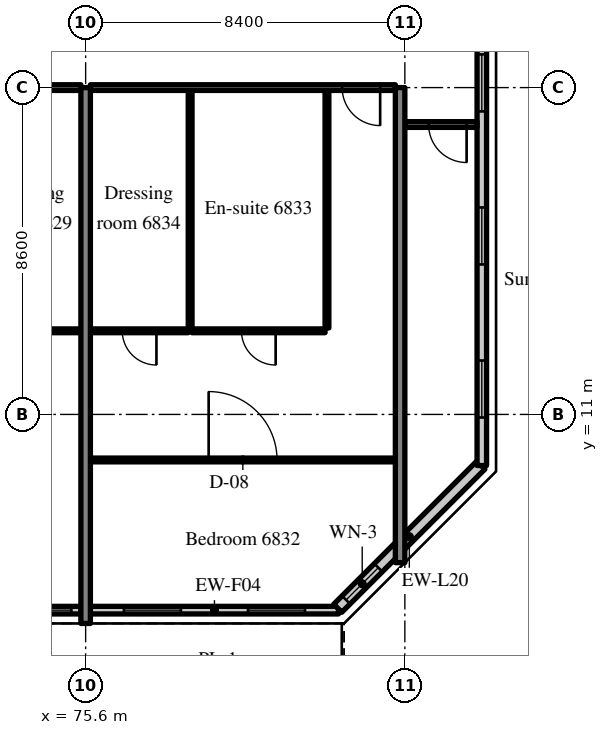
"""IFC4 building model, lengths in metres.
Left out: names, types, materials, properties, quantities, classifications, styles, units other than length and angle.
Written with IfcOpenShell. Run it as: python <this file> out.ifc"""

import sys

from ifc_helpers import new_model, si_unit, direction, frame, frame_2d, origin, place, context, subcontext, project, spatial, rectangle, extrude, source, transform, mapped, element, fill, save


model = new_model("IFC4")
c1 = context("Model", 3, precision=1e-05, world=origin(), true_north=direction((0.0, 1.0)))
c2 = subcontext(c1, "Body", "Model", "MODEL_VIEW")
j1 = project(units=[si_unit("LENGTHUNIT", "METRE"), si_unit("PLANEANGLEUNIT", "RADIAN")], contexts=[c1])
p1 = place(None, origin())
s1 = spatial("IfcSite", under=j1, at=p1, CompositionType="ELEMENT")
p2 = place(p1, origin())
s2 = spatial("IfcBuilding", under=s1, at=p2, CompositionType="ELEMENT")
p3 = place(p2, frame((0.0, 0.0, 285.7)))
s3 = spatial("IfcBuildingStorey", under=s2, at=p3, CompositionType="ELEMENT", Elevation=285.7)
m1 = source(origin(), c2, "Body", "SweptSolid", [
    extrude(rectangle(XDim=14.1, YDim=0.25, at=frame_2d((7.05, 0.0))), origin(), (0.0, 0.0, 1.0), 3.72),
])
p4 = place(p3, frame((75.6, 5.5, 0.0), z_axis=(0.0, 0.0, 1.0), x_axis=(0.0, 1.0, 0.0)))
e1 = element("IfcWall", 1, at=p4, inside=s3, PredefinedType="SHEAR", context=c2, shape_type="MappedRepresentation", body=[
    mapped(m1, transform((0.0, 0.0, 0.0), scale=1.0)),
])
m2 = source(origin(), c2, "Body", "SweptSolid", [
    extrude(rectangle(XDim=12.5, YDim=0.25, at=frame_2d((6.25, 0.0))), origin(), (0.0, 0.0, 1.0), 3.72),
])
p5 = place(p3, frame((83.875, 7.1, 0.0), z_axis=(0.0, 0.0, 1.0), x_axis=(0.0, 1.0, 0.0)))
e2 = element("IfcWall", 2, at=p5, inside=s3, PredefinedType="SHEAR", context=c2, shape_type="MappedRepresentation", body=[
    mapped(m2, transform((0.0, 0.0, 0.0), scale=1.0)),
])
m3 = source(origin(), c2, "Body", "SweptSolid", [
    extrude(rectangle(XDim=8.15, YDim=0.2, at=frame_2d((4.075, 0.0))), origin(), (0.0, 0.0, 1.0), 3.17),
])
p6 = place(p3, frame((67.325, 5.85, 0.0), z_axis=(0.0, 0.0, 1.0), x_axis=(1.0, 0.0, 0.0)))
e3 = element("IfcWall", 3, at=p6, inside=s3, PredefinedType="SOLIDWALL", context=c2, shape_type="MappedRepresentation", body=[
    mapped(m3, transform((0.0, 0.0, 0.0), scale=1.0)),
])
m4 = source(origin(), c2, "Body", "SweptSolid", [
    extrude(rectangle(XDim=1.2, YDim=2.4, at=frame_2d((0.6, 1.2))), frame((0.0, 0.11, 0.0), z_axis=(0.0, -1.0, 0.0), x_axis=(1.0, 0.0, 0.0)), (0.0, 0.0, 1.0), 0.22),
])
p7 = place(p6, frame((0.25, 0.0, 0.0)))
e4 = element("IfcOpeningElement", 4, at=p7, cuts=e3, PredefinedType="OPENING", context=c2, shape_type="MappedRepresentation", body=[
    mapped(m4, transform((0.0, 0.0, 0.0), scale=1.0)),
])
m5 = source(origin(), c2, "Body", "SweptSolid", [
    extrude(rectangle(XDim=1.5, YDim=1.5, at=frame_2d((0.75, 0.75))), frame((0.0, 0.11, 0.0), z_axis=(0.0, -1.0, 0.0), x_axis=(1.0, 0.0, 0.0)), (0.0, 0.0, 1.0), 0.22),
])
p8 = place(p6, frame((2.325, 0.0, 0.9)))
e5 = element("IfcOpeningElement", 5, at=p8, cuts=e3, PredefinedType="OPENING", context=c2, shape_type="MappedRepresentation", body=[
    mapped(m5, transform((0.0, 0.0, 0.0), scale=1.0)),
])
p9 = place(p6, frame((4.325, 0.0, 0.0)))
e6 = element("IfcOpeningElement", 6, at=p9, cuts=e3, PredefinedType="OPENING", context=c2, shape_type="MappedRepresentation", body=[
    mapped(m4, transform((0.0, 0.0, 0.0), scale=1.0)),
])
p10 = place(p6, frame((6.4, 0.0, 0.9)))
e7 = element("IfcOpeningElement", 7, at=p10, cuts=e3, PredefinedType="OPENING", context=c2, shape_type="MappedRepresentation", body=[
    mapped(m5, transform((0.0, 0.0, 0.0), scale=1.0)),
])
m6 = source(origin(), c2, "Body", "SweptSolid", [
    extrude(rectangle(XDim=6.53, YDim=0.2, at=frame_2d((3.265, 0.0))), origin(), (0.0, 0.0, 1.0), 3.17),
])
p11 = place(p3, frame((75.725, 5.85, 0.0), z_axis=(0.0, 0.0, 1.0), x_axis=(1.0, 0.0, 0.0)))
e8 = element("IfcWall", 8, at=p11, inside=s3, PredefinedType="SOLIDWALL", context=c2, shape_type="MappedRepresentation", body=[
    mapped(m6, transform((0.0, 0.0, 0.0), scale=1.0)),
])
p12 = place(p11, frame((0.883, 0.0, 0.9)))
e9 = element("IfcOpeningElement", 9, at=p12, cuts=e8, PredefinedType="OPENING", context=c2, shape_type="MappedRepresentation", body=[
    mapped(m5, transform((0.0, 0.0, 0.0), scale=1.0)),
])
p13 = place(p11, frame((4.147, 0.0, 0.9)))
e10 = element("IfcOpeningElement", 10, at=p13, cuts=e8, PredefinedType="OPENING", context=c2, shape_type="MappedRepresentation", body=[
    mapped(m5, transform((0.0, 0.0, 0.0), scale=1.0)),
])
m7 = source(origin(), c2, "Body", "SweptSolid", [
    extrude(rectangle(XDim=5.326, YDim=0.3, at=frame_2d((2.663, 0.0))), origin(), (0.0, 0.0, 1.0), 3.72),
])
p14 = place(p3, frame((82.234, 5.9, 0.0), z_axis=(0.0, 0.0, 1.0), x_axis=(0.707083859269, 0.707129702361, 0.0)))
e11 = element("IfcWall", 11, at=p14, inside=s3, PredefinedType="SOLIDWALL", context=c2, shape_type="MappedRepresentation", body=[
    mapped(m7, transform((0.0, 0.0, 0.0), scale=1.0)),
])
m8 = source(origin(), c2, "Body", "SweptSolid", [
    extrude(rectangle(XDim=1.2, YDim=1.5, at=frame_2d((0.6, 0.75))), frame((0.0, 0.16, 0.0), z_axis=(0.0, -1.0, 0.0), x_axis=(1.0, 0.0, 0.0)), (0.0, 0.0, 1.0), 0.32),
])
p15 = place(p14, frame((0.31, 0.0, 0.9)))
e12 = element("IfcOpeningElement", 12, at=p15, cuts=e11, PredefinedType="OPENING", context=c2, shape_type="MappedRepresentation", body=[
    mapped(m8, transform((0.0, 0.0, 0.0), scale=1.0)),
])
m9 = source(origin(), c2, "Body", "SweptSolid", [
    extrude(rectangle(XDim=28.189, YDim=0.25, at=frame_2d((14.095, 0.0))), origin(), (0.0, 0.0, 1.0), 3.72),
])
p16 = place(p3, frame((86.025, 9.655, 0.0), z_axis=(0.0, 0.0, 1.0), x_axis=(0.0, 1.0, 0.0)))
e13 = element("IfcWall", 13, at=p16, inside=s3, PredefinedType="SOLIDWALL", context=c2, shape_type="MappedRepresentation", body=[
    mapped(m9, transform((0.0, 0.0, 0.0), scale=1.0)),
])
m10 = source(origin(), c2, "Body", "SweptSolid", [
    extrude(rectangle(XDim=1.5, YDim=1.5, at=frame_2d((0.75, 0.75))), frame((0.0, 0.135, 0.0), z_axis=(0.0, -1.0, 0.0), x_axis=(1.0, 0.0, 0.0)), (0.0, 0.0, 1.0), 0.27),
])
p17 = place(p16, frame((1.263, 0.0, 0.9)))
e14 = element("IfcOpeningElement", 14, at=p17, cuts=e13, PredefinedType="OPENING", context=c2, shape_type="MappedRepresentation", body=[
    mapped(m10, transform((0.0, 0.0, 0.0), scale=1.0)),
])
p18 = place(p16, frame((5.291, 0.0, 0.9)))
e15 = element("IfcOpeningElement", 15, at=p18, cuts=e13, PredefinedType="OPENING", context=c2, shape_type="MappedRepresentation", body=[
    mapped(m10, transform((0.0, 0.0, 0.0), scale=1.0)),
])
p19 = place(p16, frame((9.318, 0.0, 0.9)))
e16 = element("IfcOpeningElement", 16, at=p19, cuts=e13, PredefinedType="OPENING", context=c2, shape_type="MappedRepresentation", body=[
    mapped(m10, transform((0.0, 0.0, 0.0), scale=1.0)),
])
p20 = place(p16, frame((13.345, 0.0, 0.9)))
e17 = element("IfcOpeningElement", 17, at=p20, cuts=e13, PredefinedType="OPENING", context=c2, shape_type="MappedRepresentation", body=[
    mapped(m10, transform((0.0, 0.0, 0.0), scale=1.0)),
])
p21 = place(p16, frame((17.372, 0.0, 0.9)))
e18 = element("IfcOpeningElement", 18, at=p21, cuts=e13, PredefinedType="OPENING", context=c2, shape_type="MappedRepresentation", body=[
    mapped(m10, transform((0.0, 0.0, 0.0), scale=1.0)),
])
p22 = place(p16, frame((21.399, 0.0, 0.9)))
e19 = element("IfcOpeningElement", 19, at=p22, cuts=e13, PredefinedType="OPENING", context=c2, shape_type="MappedRepresentation", body=[
    mapped(m10, transform((0.0, 0.0, 0.0), scale=1.0)),
])
p23 = place(p16, frame((25.426, 0.0, 0.9)))
e20 = element("IfcOpeningElement", 20, at=p23, cuts=e13, PredefinedType="OPENING", context=c2, shape_type="MappedRepresentation", body=[
    mapped(m10, transform((0.0, 0.0, 0.0), scale=1.0)),
])
m11 = source(origin(), c2, "Body", "SweptSolid", [
    extrude(rectangle(XDim=2.7, YDim=0.1, at=frame_2d((1.35, 0.0))), origin(), (0.0, 0.0, 1.0), 3.72),
])
p24 = place(p3, frame((72.775, 13.2, 0.0), z_axis=(0.0, 0.0, 1.0), x_axis=(1.0, 0.0, 0.0)))
e21 = element("IfcWall", 21, at=p24, inside=s3, PredefinedType="PARTITIONING", context=c2, shape_type="MappedRepresentation", body=[
    mapped(m11, transform((0.0, 0.0, 0.0), scale=1.0)),
])
m12 = source(origin(), c2, "Body", "SweptSolid", [
    extrude(rectangle(XDim=0.9, YDim=2.1, at=frame_2d((0.45, 1.05))), frame((0.0, 0.06, 0.0), z_axis=(0.0, -1.0, 0.0), x_axis=(1.0, 0.0, 0.0)), (0.0, 0.0, 1.0), 0.12),
])
p25 = place(p24, frame((0.9, 0.0, 0.0)))
e22 = element("IfcOpeningElement", 22, at=p25, cuts=e21, PredefinedType="OPENING", context=c2, shape_type="MappedRepresentation", body=[
    mapped(m12, transform((0.0, 0.0, 0.0), scale=1.0)),
])
m13 = source(origin(), c2, "Body", "SweptSolid", [
    extrude(rectangle(XDim=8.15, YDim=0.15, at=frame_2d((4.075, 0.0))), origin(), (0.0, 0.0, 1.0), 3.02),
])
p26 = place(p3, frame((67.325, 19.6, 0.0), z_axis=(0.0, 0.0, 1.0), x_axis=(1.0, 0.0, 0.0)))
e23 = element("IfcWall", 23, at=p26, inside=s3, PredefinedType="PARTITIONING", context=c2, shape_type="MappedRepresentation", body=[
    mapped(m13, transform((0.0, 0.0, 0.0), scale=1.0)),
])
m14 = source(origin(), c2, "Body", "SweptSolid", [
    extrude(rectangle(XDim=1.0, YDim=2.1, at=frame_2d((0.5, 1.05))), frame((0.0, 0.085, 0.0), z_axis=(0.0, -1.0, 0.0), x_axis=(1.0, 0.0, 0.0)), (0.0, 0.0, 1.0), 0.17),
])
p27 = place(p26, frame((0.4, 0.0, 0.0)))
e24 = element("IfcOpeningElement", 24, at=p27, cuts=e23, PredefinedType="OPENING", context=c2, shape_type="MappedRepresentation", body=[
    mapped(m14, transform((0.0, 0.0, 0.0), scale=1.0)),
])
m15 = source(origin(), c2, "Body", "SweptSolid", [
    extrude(rectangle(XDim=6.25, YDim=0.1, at=frame_2d((3.125, 0.0))), origin(), (0.0, 0.0, 1.0), 3.72),
])
for number, where, z_axis, x_axis in (
    (25, (81.95, 13.275, 0.0), (0.0, 0.0, 1.0), (0.0, 1.0, 0.0)),
    (26, (78.35, 13.275, 0.0), (0.0, 0.0, 1.0), (0.0, 1.0, 0.0)),
):
    element("IfcWall", number, at=place(p3, frame(where, z_axis=z_axis, x_axis=x_axis)), inside=s3, PredefinedType="PARTITIONING", context=c2, shape_type="MappedRepresentation", body=[
        mapped(m15, transform((0.0, 0.0, 0.0), scale=1.0)),
    ])
m16 = source(origin(), c2, "Body", "SweptSolid", [
    extrude(rectangle(XDim=3.5, YDim=0.1, at=frame_2d((1.75, 0.0))), origin(), (0.0, 0.0, 1.0), 3.72),
])
p28 = place(p3, frame((78.4, 13.2, 0.0), z_axis=(0.0, 0.0, 1.0), x_axis=(1.0, 0.0, 0.0)))
e27 = element("IfcWall", 27, at=p28, inside=s3, PredefinedType="PARTITIONING", context=c2, shape_type="MappedRepresentation", body=[
    mapped(m16, transform((0.0, 0.0, 0.0), scale=1.0)),
])
p29 = place(p28, frame((1.3, 0.0, 0.0)))
e28 = element("IfcOpeningElement", 28, at=p29, cuts=e27, PredefinedType="OPENING", context=c2, shape_type="MappedRepresentation", body=[
    mapped(m12, transform((0.0, 0.0, 0.0), scale=1.0)),
])
m17 = source(origin(), c2, "Body", "SweptSolid", [
    extrude(rectangle(XDim=2.575, YDim=0.1, at=frame_2d((1.288, 0.0))), origin(), (0.0, 0.0, 1.0), 3.72),
])
p30 = place(p3, frame((75.725, 13.2, 0.0), z_axis=(0.0, 0.0, 1.0), x_axis=(1.0, 0.0, 0.0)))
e29 = element("IfcWall", 29, at=p30, inside=s3, PredefinedType="PARTITIONING", context=c2, shape_type="MappedRepresentation", body=[
    mapped(m17, transform((0.0, 0.0, 0.0), scale=1.0)),
])
p31 = place(p30, frame((0.838, 0.0, 0.0)))
e30 = element("IfcOpeningElement", 30, at=p31, cuts=e29, PredefinedType="OPENING", context=c2, shape_type="MappedRepresentation", body=[
    mapped(m12, transform((0.0, 0.0, 0.0), scale=1.0)),
])
m18 = source(origin(), c2, "Body", "SweptSolid", [
    extrude(rectangle(XDim=8.025, YDim=0.1, at=frame_2d((4.012, 0.0))), origin(), (0.0, 0.0, 1.0), 3.72),
])
p32 = place(p3, frame((75.725, 9.802, 0.0), z_axis=(0.0, 0.0, 1.0), x_axis=(1.0, 0.0, 0.0)))
e31 = element("IfcWall", 31, at=p32, inside=s3, PredefinedType="PARTITIONING", context=c2, shape_type="MappedRepresentation", body=[
    mapped(m18, transform((0.0, 0.0, 0.0), scale=1.0)),
])
m19 = source(origin(), c2, "Body", "SweptSolid", [
    extrude(rectangle(XDim=1.8, YDim=2.1, at=frame_2d((0.9, 1.05))), frame((0.0, 0.06, 0.0), z_axis=(0.0, -1.0, 0.0), x_axis=(1.0, 0.0, 0.0)), (0.0, 0.0, 1.0), 0.12),
])
p33 = place(p32, frame((3.112, 0.0, 0.0)))
e32 = element("IfcOpeningElement", 32, at=p33, cuts=e31, PredefinedType="OPENING", context=c2, shape_type="MappedRepresentation", body=[
    mapped(m19, transform((0.0, 0.0, 0.0), scale=1.0)),
])
m20 = source(origin(), c2, "Body", "SweptSolid", [
    extrude(rectangle(XDim=8.025, YDim=0.15, at=frame_2d((4.012, 0.0))), origin(), (0.0, 0.0, 1.0), 3.02),
])
p34 = place(p3, frame((75.725, 19.6, 0.0), z_axis=(0.0, 0.0, 1.0), x_axis=(1.0, 0.0, 0.0)))
e33 = element("IfcWall", 33, at=p34, inside=s3, PredefinedType="PARTITIONING", context=c2, shape_type="MappedRepresentation", body=[
    mapped(m20, transform((0.0, 0.0, 0.0), scale=1.0)),
])
p35 = place(p34, frame((6.625, 0.0, 0.0)))
e34 = element("IfcOpeningElement", 34, at=p35, cuts=e33, PredefinedType="OPENING", context=c2, shape_type="MappedRepresentation", body=[
    mapped(m14, transform((0.0, 0.0, 0.0), scale=1.0)),
])
m21 = source(origin(), c2, "Body", "SweptSolid", [
    extrude(rectangle(XDim=1.9, YDim=0.15, at=frame_2d((0.95, 0.0))), origin(), (0.0, 0.0, 1.0), 3.02),
])
p36 = place(p3, frame((84.0, 18.628, 0.0), z_axis=(0.0, 0.0, 1.0), x_axis=(1.0, 0.0, 0.0)))
e35 = element("IfcWall", 35, at=p36, inside=s3, PredefinedType="PARTITIONING", context=c2, shape_type="MappedRepresentation", body=[
    mapped(m21, transform((0.0, 0.0, 0.0), scale=1.0)),
])
p37 = place(p36, frame((0.625, 0.0, 0.0)))
e36 = element("IfcOpeningElement", 36, at=p37, cuts=e35, PredefinedType="OPENING", context=c2, shape_type="MappedRepresentation", body=[
    mapped(m14, transform((0.0, 0.0, 0.0), scale=1.0)),
])
m22 = source(origin(), c2, "Body", "SweptSolid", [
    extrude(rectangle(XDim=1.5, YDim=1.5, at=frame_2d((0.75, 0.75))), frame((0.0, 0.03, 0.0), z_axis=(0.0, -1.0, 0.0), x_axis=(1.0, 0.0, 0.0)), (0.0, 0.0, 1.0), 0.06),
])
p38 = place(p10, origin())
e37 = element("IfcWindow", 37, at=p38, inside=s3, PartitioningType="SINGLE_PANEL", PredefinedType="WINDOW", context=c2, shape_type="MappedRepresentation", body=[
    mapped(m22, transform((0.0, 0.0, 0.0), scale=1.0)),
])
fill(e7, e37)
p39 = place(p12, origin())
e38 = element("IfcWindow", 38, at=p39, inside=s3, PartitioningType="SINGLE_PANEL", PredefinedType="WINDOW", context=c2, shape_type="MappedRepresentation", body=[
    mapped(m22, transform((0.0, 0.0, 0.0), scale=1.0)),
])
fill(e9, e38)
p40 = place(p13, origin())
e39 = element("IfcWindow", 39, at=p40, inside=s3, PartitioningType="SINGLE_PANEL", PredefinedType="WINDOW", context=c2, shape_type="MappedRepresentation", body=[
    mapped(m22, transform((0.0, 0.0, 0.0), scale=1.0)),
])
fill(e10, e39)
m23 = source(origin(), c2, "Body", "SweptSolid", [
    extrude(rectangle(XDim=1.2, YDim=1.5, at=frame_2d((0.6, 0.75))), frame((0.0, 0.03, 0.0), z_axis=(0.0, -1.0, 0.0), x_axis=(1.0, 0.0, 0.0)), (0.0, 0.0, 1.0), 0.06),
])
p41 = place(p15, origin())
e40 = element("IfcWindow", 40, at=p41, inside=s3, PartitioningType="SINGLE_PANEL", PredefinedType="WINDOW", context=c2, shape_type="MappedRepresentation", body=[
    mapped(m23, transform((0.0, 0.0, 0.0), scale=1.0)),
])
fill(e12, e40)
p42 = place(p17, origin())
e41 = element("IfcWindow", 41, at=p42, inside=s3, PartitioningType="SINGLE_PANEL", PredefinedType="WINDOW", context=c2, shape_type="MappedRepresentation", body=[
    mapped(m22, transform((0.0, 0.0, 0.0), scale=1.0)),
])
fill(e14, e41)
p43 = place(p18, origin())
e42 = element("IfcWindow", 42, at=p43, inside=s3, PartitioningType="SINGLE_PANEL", PredefinedType="WINDOW", context=c2, shape_type="MappedRepresentation", body=[
    mapped(m22, transform((0.0, 0.0, 0.0), scale=1.0)),
])
fill(e15, e42)
p44 = place(p19, origin())
e43 = element("IfcWindow", 43, at=p44, inside=s3, PartitioningType="SINGLE_PANEL", PredefinedType="WINDOW", context=c2, shape_type="MappedRepresentation", body=[
    mapped(m22, transform((0.0, 0.0, 0.0), scale=1.0)),
])
fill(e16, e43)
m24 = source(origin(), c2, "Body", "SweptSolid", [
    extrude(rectangle(XDim=0.9, YDim=2.1, at=frame_2d((0.45, 1.05))), frame((0.0, 0.025, 0.0), z_axis=(0.0, -1.0, 0.0), x_axis=(1.0, 0.0, 0.0)), (0.0, 0.0, 1.0), 0.05),
])
p45 = place(p29, origin())
e44 = element("IfcDoor", 44, at=p45, inside=s3, OperationType="SINGLE_SWING_RIGHT", PredefinedType="DOOR", context=c2, shape_type="MappedRepresentation", body=[
    mapped(m24, transform((0.0, 0.0, 0.0), scale=1.0)),
])
fill(e28, e44)
p46 = place(p31, origin())
e45 = element("IfcDoor", 45, at=p46, inside=s3, OperationType="SINGLE_SWING_RIGHT", PredefinedType="DOOR", context=c2, shape_type="MappedRepresentation", body=[
    mapped(m24, transform((0.0, 0.0, 0.0), scale=1.0)),
])
fill(e30, e45)
m25 = source(origin(), c2, "Body", "SweptSolid", [
    extrude(rectangle(XDim=1.8, YDim=2.1, at=frame_2d((0.9, 1.05))), frame((0.0, 0.025, 0.0), z_axis=(0.0, -1.0, 0.0), x_axis=(1.0, 0.0, 0.0)), (0.0, 0.0, 1.0), 0.05),
])
p47 = place(p33, origin())
e46 = element("IfcDoor", 46, at=p47, inside=s3, OperationType="DOUBLE_DOOR_SINGLE_SWING", PredefinedType="DOOR", context=c2, shape_type="MappedRepresentation", body=[
    mapped(m25, transform((0.0, 0.0, 0.0), scale=1.0)),
])
fill(e32, e46)
m26 = source(origin(), c2, "Body", "SweptSolid", [
    extrude(rectangle(XDim=1.0, YDim=2.1, at=frame_2d((0.5, 1.05))), frame((0.0, 0.025, 0.0), z_axis=(0.0, -1.0, 0.0), x_axis=(1.0, 0.0, 0.0)), (0.0, 0.0, 1.0), 0.05),
])
p48 = place(p35, origin())
e47 = element("IfcDoor", 47, at=p48, inside=s3, OperationType="SINGLE_SWING_RIGHT", PredefinedType="DOOR", context=c2, shape_type="MappedRepresentation", body=[
    mapped(m26, transform((0.0, 0.0, 0.0), scale=1.0)),
])
fill(e34, e47)
p49 = place(p37, origin())
e48 = element("IfcDoor", 48, at=p49, inside=s3, OperationType="SINGLE_SWING_RIGHT", PredefinedType="DOOR", context=c2, shape_type="MappedRepresentation", body=[
    mapped(m26, transform((0.0, 0.0, 0.0), scale=1.0)),
])
fill(e36, e48)
save(model, sys.argv[1])
